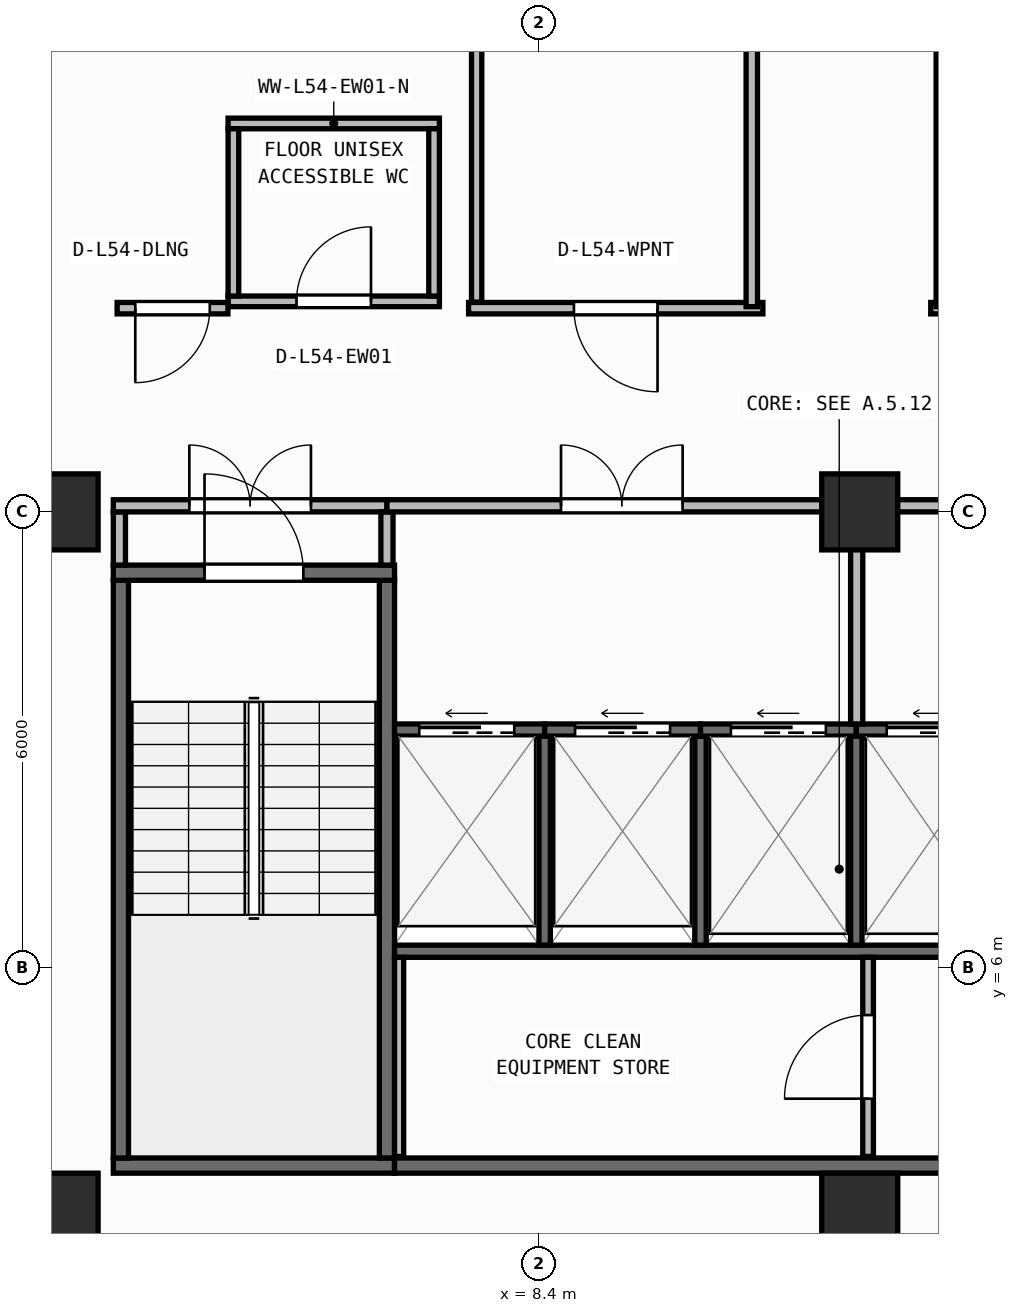
"""IFC4 building model, lengths in metres.
Left out: names, types, materials, properties, quantities, classifications, styles, units other than length and angle.
Written with IfcOpenShell. Run it as: python <this file> out.ifc"""

import sys

from ifc_helpers import new_model, si_unit, direction, frame, frame_2d, origin, origin_2d, place, context, subcontext, project, spatial, rectangle, extrude, element, fill, save


model = new_model("IFC4")
c1 = context("Model", 3, precision=1e-05, world=origin(), true_north=direction((0.0, 1.0)))
c2 = subcontext(c1, "Body", "Model", "MODEL_VIEW")
j1 = project(units=[si_unit("LENGTHUNIT", "METRE"), si_unit("PLANEANGLEUNIT", "RADIAN")], contexts=[c1])
p1 = place(None, origin())
s1 = spatial("IfcSite", under=j1, at=p1, CompositionType="ELEMENT")
p2 = place(p1, origin())
s2 = spatial("IfcBuilding", under=s1, at=p2, CompositionType="ELEMENT")
p3 = place(p2, frame((0.0, 0.0, 219.75)))
s3 = spatial("IfcBuildingStorey", under=s2, at=p3, CompositionType="ELEMENT", Elevation=219.75)
for number, where, z_axis, x_axis in (
    (1, (2.1, 2.8, 0.0), (0.0, 0.0, 1.0), (1.0, 0.0, 0.0)),
    (2, (12.62, 2.8, 0.0), (0.0, 0.0, 1.0), (1.0, 0.0, 0.0)),
    (3, (2.1, 12.0, 0.0), (0.0, 0.0, 1.0), (1.0, 0.0, 0.0)),
    (4, (12.62, 12.0, 0.0), (0.0, 0.0, 1.0), (1.0, 0.0, 0.0)),
):
    element("IfcColumn", number, at=place(p3, frame(where, z_axis=z_axis, x_axis=x_axis)), inside=s3, PredefinedType="COLUMN", context=c2, shape_type="SweptSolid", body=[
        extrude(rectangle(XDim=1.0, YDim=1.0, at=origin_2d()), origin(), (0.0, 0.0, 1.0), 3.95),
    ])
p4 = place(p3, frame((2.66, 0.174, 0.0), z_axis=(0.0, 0.0, 1.0), x_axis=(0.996634028439, 0.081979347142, 0.0)))
e5 = element("IfcWall", 5, at=p4, inside=s3, PredefinedType="STANDARD", context=c2, shape_type="SweptSolid", body=[
    extrude(rectangle(XDim=46.035, YDim=0.26, at=frame_2d((23.018, 0.0))), origin(), (0.0, 0.0, 1.0), 3.71),
])
p5 = place(p4, frame((21.817, 0.0, 0.9)))
e6 = element("IfcOpeningElement", 6, at=p5, cuts=e5, PredefinedType="OPENING", context=c2, shape_type="SweptSolid", body=[
    extrude(rectangle(XDim=2.4, YDim=1.65, at=frame_2d((1.2, 0.825))), frame((0.0, 0.14, 0.0), z_axis=(0.0, -1.0, 0.0), x_axis=(1.0, 0.0, 0.0)), (0.0, 0.0, 1.0), 0.28),
])
p6 = place(p3, frame((2.8, 3.4, 0.0), z_axis=(0.0, 0.0, 1.0), x_axis=(1.0, 0.0, 0.0)))
e7 = element("IfcWall", 7, at=p6, inside=s3, PredefinedType="SHEAR", context=c2, shape_type="SweptSolid", body=[
    extrude(rectangle(XDim=3.7, YDim=0.2, at=frame_2d((1.85, 0.0))), origin(), (0.0, 0.0, 1.0), 3.71),
])
for number, where, z_axis, x_axis in (
    (8, (2.9, 3.5, 0.0), (0.0, 0.0, 1.0), (0.0, 1.0, 0.0)),
    (9, (6.4, 3.5, 0.0), (0.0, 0.0, 1.0), (0.0, 1.0, 0.0)),
):
    element("IfcWall", number, at=place(p3, frame(where, z_axis=z_axis, x_axis=x_axis)), inside=s3, PredefinedType="SHEAR", context=c2, shape_type="SweptSolid", body=[
        extrude(rectangle(XDim=7.6, YDim=0.2, at=frame_2d((3.8, 0.0))), origin(), (0.0, 0.0, 1.0), 3.71),
    ])
p7 = place(p3, frame((2.8, 11.2, 0.0), z_axis=(0.0, 0.0, 1.0), x_axis=(1.0, 0.0, 0.0)))
e10 = element("IfcWall", 10, at=p7, inside=s3, PredefinedType="SHEAR", context=c2, shape_type="SweptSolid", body=[
    extrude(rectangle(XDim=3.7, YDim=0.2, at=frame_2d((1.85, 0.0))), origin(), (0.0, 0.0, 1.0), 3.71),
])
p8 = place(p7, frame((1.2, 0.0, 0.0)))
e11 = element("IfcOpeningElement", 11, at=p8, cuts=e10, PredefinedType="OPENING", context=c2, shape_type="SweptSolid", body=[
    extrude(rectangle(XDim=1.3, YDim=2.15, at=frame_2d((0.65, 1.075))), frame((0.0, 0.11, 0.0), z_axis=(0.0, -1.0, 0.0), x_axis=(1.0, 0.0, 0.0)), (0.0, 0.0, 1.0), 0.22),
])
p9 = place(p3, frame((6.5, 3.4, 0.0), z_axis=(0.0, 0.0, 1.0), x_axis=(1.0, 0.0, 0.0)))
e12 = element("IfcWall", 12, at=p9, inside=s3, PredefinedType="SHEAR", context=c2, shape_type="SweptSolid", body=[
    extrude(rectangle(XDim=13.7, YDim=0.2, at=frame_2d((6.85, 0.0))), origin(), (0.0, 0.0, 1.0), 3.71),
])
p10 = place(p3, frame((6.5, 6.22, 0.0), z_axis=(0.0, 0.0, 1.0), x_axis=(1.0, 0.0, 0.0)))
e13 = element("IfcWall", 13, at=p10, inside=s3, PredefinedType="SHEAR", context=c2, shape_type="SweptSolid", body=[
    extrude(rectangle(XDim=12.11, YDim=0.16, at=frame_2d((6.055, 0.0))), origin(), (0.0, 0.0, 1.0), 3.71),
])
for number, where, z_axis, x_axis in (
    (14, (8.475, 6.3, 0.0), (0.0, 0.0, 1.0), (0.0, 1.0, 0.0)),
    (15, (10.525, 6.3, 0.0), (0.0, 0.0, 1.0), (0.0, 1.0, 0.0)),
    (16, (12.575, 6.3, 0.0), (0.0, 0.0, 1.0), (0.0, 1.0, 0.0)),
):
    element("IfcWall", number, at=place(p3, frame(where, z_axis=z_axis, x_axis=x_axis)), inside=s3, PredefinedType="SHEAR", context=c2, shape_type="SweptSolid", body=[
        extrude(rectangle(XDim=2.75, YDim=0.15, at=frame_2d((1.375, 0.0))), origin(), (0.0, 0.0, 1.0), 3.71),
    ])
p11 = place(p3, frame((6.5, 9.13, 0.0), z_axis=(0.0, 0.0, 1.0), x_axis=(1.0, 0.0, 0.0)))
e17 = element("IfcWall", 17, at=p11, inside=s3, PredefinedType="SHEAR", context=c2, shape_type="SweptSolid", body=[
    extrude(rectangle(XDim=1.975, YDim=0.16, at=frame_2d((0.988, 0.0))), origin(), (0.0, 0.0, 1.0), 3.71),
])
p12 = place(p11, frame((0.325, 0.0, 0.0)))
e18 = element("IfcOpeningElement", 18, at=p12, cuts=e17, PredefinedType="OPENING", context=c2, shape_type="SweptSolid", body=[
    extrude(rectangle(XDim=1.25, YDim=2.15, at=frame_2d((0.625, 1.075))), frame((0.0, 0.09, 0.0), z_axis=(0.0, -1.0, 0.0), x_axis=(1.0, 0.0, 0.0)), (0.0, 0.0, 1.0), 0.18),
])
p13 = place(p3, frame((8.475, 9.13, 0.0), z_axis=(0.0, 0.0, 1.0), x_axis=(1.0, 0.0, 0.0)))
e19 = element("IfcWall", 19, at=p13, inside=s3, PredefinedType="SHEAR", context=c2, shape_type="SweptSolid", body=[
    extrude(rectangle(XDim=2.05, YDim=0.16, at=frame_2d((1.025, 0.0))), origin(), (0.0, 0.0, 1.0), 3.71),
])
p14 = place(p13, frame((0.4, 0.0, 0.0)))
e20 = element("IfcOpeningElement", 20, at=p14, cuts=e19, PredefinedType="OPENING", context=c2, shape_type="SweptSolid", body=[
    extrude(rectangle(XDim=1.25, YDim=2.15, at=frame_2d((0.625, 1.075))), frame((0.0, 0.09, 0.0), z_axis=(0.0, -1.0, 0.0), x_axis=(1.0, 0.0, 0.0)), (0.0, 0.0, 1.0), 0.18),
])
p15 = place(p3, frame((10.525, 9.13, 0.0), z_axis=(0.0, 0.0, 1.0), x_axis=(1.0, 0.0, 0.0)))
e21 = element("IfcWall", 21, at=p15, inside=s3, PredefinedType="SHEAR", context=c2, shape_type="SweptSolid", body=[
    extrude(rectangle(XDim=2.05, YDim=0.16, at=frame_2d((1.025, 0.0))), origin(), (0.0, 0.0, 1.0), 3.71),
])
p16 = place(p15, frame((0.4, 0.0, 0.0)))
e22 = element("IfcOpeningElement", 22, at=p16, cuts=e21, PredefinedType="OPENING", context=c2, shape_type="SweptSolid", body=[
    extrude(rectangle(XDim=1.25, YDim=2.15, at=frame_2d((0.625, 1.075))), frame((0.0, 0.09, 0.0), z_axis=(0.0, -1.0, 0.0), x_axis=(1.0, 0.0, 0.0)), (0.0, 0.0, 1.0), 0.18),
])
p17 = place(p3, frame((12.575, 9.13, 0.0), z_axis=(0.0, 0.0, 1.0), x_axis=(1.0, 0.0, 0.0)))
e23 = element("IfcWall", 23, at=p17, inside=s3, PredefinedType="SHEAR", context=c2, shape_type="SweptSolid", body=[
    extrude(rectangle(XDim=2.05, YDim=0.16, at=frame_2d((1.025, 0.0))), origin(), (0.0, 0.0, 1.0), 3.71),
])
p18 = place(p17, frame((0.4, 0.0, 0.0)))
e24 = element("IfcOpeningElement", 24, at=p18, cuts=e23, PredefinedType="OPENING", context=c2, shape_type="SweptSolid", body=[
    extrude(rectangle(XDim=1.25, YDim=2.15, at=frame_2d((0.625, 1.075))), frame((0.0, 0.09, 0.0), z_axis=(0.0, -1.0, 0.0), x_axis=(1.0, 0.0, 0.0)), (0.0, 0.0, 1.0), 0.18),
])
p19 = place(p3, frame((6.56, 3.52, 0.0), z_axis=(0.0, 0.0, 1.0), x_axis=(0.0, 1.0, 0.0)))
e25 = element("IfcWall", 25, at=p19, inside=s3, PredefinedType="PARTITIONING", context=c2, shape_type="SweptSolid", body=[
    extrude(rectangle(XDim=2.62, YDim=0.12, at=frame_2d((1.31, 0.0))), origin(), (0.0, 0.0, 1.0), 3.71),
])
p20 = place(p3, frame((12.73, 3.52, 0.0), z_axis=(0.0, 0.0, 1.0), x_axis=(0.0, 1.0, 0.0)))
e26 = element("IfcWall", 26, at=p20, inside=s3, PredefinedType="PARTITIONING", context=c2, shape_type="SweptSolid", body=[
    extrude(rectangle(XDim=2.62, YDim=0.14, at=frame_2d((1.31, 0.0))), origin(), (0.0, 0.0, 1.0), 3.71),
])
p21 = place(p20, frame((0.76, 0.0, 0.0)))
e27 = element("IfcOpeningElement", 27, at=p21, cuts=e26, PredefinedType="OPENING", context=c2, shape_type="SweptSolid", body=[
    extrude(rectangle(XDim=1.1, YDim=2.1, at=frame_2d((0.55, 1.05))), frame((0.0, 0.08, 0.0), z_axis=(0.0, -1.0, 0.0), x_axis=(1.0, 0.0, 0.0)), (0.0, 0.0, 1.0), 0.16),
])
p22 = place(p3, frame((2.88, 11.3, 0.0), z_axis=(0.0, 0.0, 1.0), x_axis=(0.0, 1.0, 0.0)))
e28 = element("IfcWall", 28, at=p22, inside=s3, PredefinedType="PARTITIONING", context=c2, shape_type="SweptSolid", body=[
    extrude(rectangle(XDim=0.7, YDim=0.16, at=frame_2d((0.35, 0.0))), origin(), (0.0, 0.0, 1.0), 3.71),
])
p23 = place(p3, frame((2.8, 12.08, 0.0), z_axis=(0.0, 0.0, 1.0), x_axis=(1.0, 0.0, 0.0)))
e29 = element("IfcWall", 29, at=p23, inside=s3, PredefinedType="PARTITIONING", context=c2, shape_type="SweptSolid", body=[
    extrude(rectangle(XDim=3.6, YDim=0.16, at=frame_2d((1.8, 0.0))), origin(), (0.0, 0.0, 1.0), 3.152),
])
p24 = place(p23, frame((1.0, 0.0, 0.0)))
e30 = element("IfcOpeningElement", 30, at=p24, cuts=e29, PredefinedType="OPENING", context=c2, shape_type="SweptSolid", body=[
    extrude(rectangle(XDim=1.6, YDim=2.05, at=frame_2d((0.8, 1.025))), frame((0.0, 0.09, 0.0), z_axis=(0.0, -1.0, 0.0), x_axis=(1.0, 0.0, 0.0)), (0.0, 0.0, 1.0), 0.18),
])
p25 = place(p3, frame((6.4, 11.3, 0.0), z_axis=(0.0, 0.0, 1.0), x_axis=(0.0, 1.0, 0.0)))
e31 = element("IfcWall", 31, at=p25, inside=s3, PredefinedType="PARTITIONING", context=c2, shape_type="SweptSolid", body=[
    extrude(rectangle(XDim=0.7, YDim=0.16, at=frame_2d((0.35, 0.0))), origin(), (0.0, 0.0, 1.0), 3.71),
])
p26 = place(p3, frame((6.4, 12.08, 0.0), z_axis=(0.0, 0.0, 1.0), x_axis=(1.0, 0.0, 0.0)))
e32 = element("IfcWall", 32, at=p26, inside=s3, PredefinedType="PARTITIONING", context=c2, shape_type="SweptSolid", body=[
    extrude(rectangle(XDim=6.18, YDim=0.16, at=frame_2d((3.09, 0.0))), origin(), (0.0, 0.0, 1.0), 3.152),
])
p27 = place(p26, frame((2.29, 0.0, 0.0)))
e33 = element("IfcOpeningElement", 33, at=p27, cuts=e32, PredefinedType="OPENING", context=c2, shape_type="SweptSolid", body=[
    extrude(rectangle(XDim=1.6, YDim=2.05, at=frame_2d((0.8, 1.025))), frame((0.0, 0.09, 0.0), z_axis=(0.0, -1.0, 0.0), x_axis=(1.0, 0.0, 0.0)), (0.0, 0.0, 1.0), 0.18),
])
p28 = place(p3, frame((12.58, 9.21, 0.0), z_axis=(0.0, 0.0, 1.0), x_axis=(0.0, 1.0, 0.0)))
e34 = element("IfcWall", 34, at=p28, inside=s3, PredefinedType="PARTITIONING", context=c2, shape_type="SweptSolid", body=[
    extrude(rectangle(XDim=2.79, YDim=0.16, at=frame_2d((1.395, 0.0))), origin(), (0.0, 0.0, 1.0), 3.71),
])
p29 = place(p3, frame((12.58, 12.08, 0.0), z_axis=(0.0, 0.0, 1.0), x_axis=(1.0, 0.0, 0.0)))
e35 = element("IfcWall", 35, at=p29, inside=s3, PredefinedType="PARTITIONING", context=c2, shape_type="SweptSolid", body=[
    extrude(rectangle(XDim=7.7, YDim=0.16, at=frame_2d((3.85, 0.0))), origin(), (0.0, 0.0, 1.0), 3.152),
])
p30 = place(p29, frame((3.05, 0.0, 0.0)))
e36 = element("IfcOpeningElement", 36, at=p30, cuts=e35, PredefinedType="OPENING", context=c2, shape_type="SweptSolid", body=[
    extrude(rectangle(XDim=1.6, YDim=2.05, at=frame_2d((0.8, 1.025))), frame((0.0, 0.09, 0.0), z_axis=(0.0, -1.0, 0.0), x_axis=(1.0, 0.0, 0.0)), (0.0, 0.0, 1.0), 0.18),
])
p31 = place(p3, frame((4.31, 14.77, 0.0), z_axis=(0.0, 0.0, 1.0), x_axis=(1.0, 0.0, 0.0)))
e37 = element("IfcWall", 37, at=p31, inside=s3, PredefinedType="PARTITIONING", context=c2, shape_type="SweptSolid", body=[
    extrude(rectangle(XDim=2.78, YDim=0.14, at=frame_2d((1.39, 0.0))), origin(), (0.0, 0.0, 1.0), 3.71),
])
p32 = place(p31, frame((0.9, 0.0, 0.0)))
e38 = element("IfcOpeningElement", 38, at=p32, cuts=e37, PredefinedType="OPENING", context=c2, shape_type="SweptSolid", body=[
    extrude(rectangle(XDim=0.98, YDim=2.1, at=frame_2d((0.49, 1.05))), frame((0.0, 0.08, 0.0), z_axis=(0.0, -1.0, 0.0), x_axis=(1.0, 0.0, 0.0)), (0.0, 0.0, 1.0), 0.16),
])
p33 = place(p3, frame((4.31, 17.11, 0.0), z_axis=(0.0, 0.0, 1.0), x_axis=(1.0, 0.0, 0.0)))
e39 = element("IfcWall", 39, at=p33, inside=s3, PredefinedType="PARTITIONING", context=c2, shape_type="SweptSolid", body=[
    extrude(rectangle(XDim=2.78, YDim=0.14, at=frame_2d((1.39, 0.0))), origin(), (0.0, 0.0, 1.0), 3.71),
])
for number, where, z_axis, x_axis in (
    (40, (4.38, 14.84, 0.0), (0.0, 0.0, 1.0), (0.0, 1.0, 0.0)),
    (41, (7.02, 14.84, 0.0), (0.0, 0.0, 1.0), (0.0, 1.0, 0.0)),
):
    element("IfcWall", number, at=place(p3, frame(where, z_axis=z_axis, x_axis=x_axis)), inside=s3, PredefinedType="PARTITIONING", context=c2, shape_type="SweptSolid", body=[
        extrude(rectangle(XDim=2.2, YDim=0.14, at=frame_2d((1.1, 0.0))), origin(), (0.0, 0.0, 1.0), 3.71),
    ])
p34 = place(p3, frame((4.308, 14.68, 0.0), z_axis=(0.0, 0.0, 1.0), x_axis=(-1.0, 0.0, 0.0)))
e42 = element("IfcWall", 42, at=p34, inside=s3, PredefinedType="PARTITIONING", context=c2, shape_type="SweptSolid", body=[
    extrude(rectangle(XDim=1.458, YDim=0.15, at=frame_2d((0.729, 0.0))), origin(), (0.0, 0.0, 1.0), 3.71),
])
p35 = place(p34, frame((0.239, 0.0, 0.0)))
e43 = element("IfcOpeningElement", 43, at=p35, cuts=e42, PredefinedType="OPENING", context=c2, shape_type="SweptSolid", body=[
    extrude(rectangle(XDim=0.98, YDim=2.1, at=frame_2d((0.49, 1.05))), frame((0.0, 0.085, 0.0), z_axis=(0.0, -1.0, 0.0), x_axis=(1.0, 0.0, 0.0)), (0.0, 0.0, 1.0), 0.17),
])
p36 = place(p3, frame((11.346, 14.68, 0.0), z_axis=(0.0, 0.0, 1.0), x_axis=(-1.0, 0.0, 0.0)))
e44 = element("IfcWall", 44, at=p36, inside=s3, PredefinedType="PARTITIONING", context=c2, shape_type="SweptSolid", body=[
    extrude(rectangle(XDim=3.872, YDim=0.15, at=frame_2d((1.936, 0.0))), origin(), (0.0, 0.0, 1.0), 3.71),
])
p37 = place(p36, frame((1.386, 0.0, 0.0)))
e45 = element("IfcOpeningElement", 45, at=p37, cuts=e44, PredefinedType="OPENING", context=c2, shape_type="SweptSolid", body=[
    extrude(rectangle(XDim=1.1, YDim=2.1, at=frame_2d((0.55, 1.05))), frame((0.0, 0.085, 0.0), z_axis=(0.0, -1.0, 0.0), x_axis=(1.0, 0.0, 0.0)), (0.0, 0.0, 1.0), 0.17),
])
p38 = place(p3, frame((34.766, 14.68, 0.0), z_axis=(0.0, 0.0, 1.0), x_axis=(-1.0, 0.0, 0.0)))
e46 = element("IfcWall", 46, at=p38, inside=s3, PredefinedType="PARTITIONING", context=c2, shape_type="SweptSolid", body=[
    extrude(rectangle(XDim=21.212, YDim=0.15, at=frame_2d((10.606, 0.0))), origin(), (0.0, 0.0, 1.0), 3.71),
])
p39 = place(p38, frame((10.056, 0.0, 0.0)))
e47 = element("IfcOpeningElement", 47, at=p39, cuts=e46, PredefinedType="OPENING", context=c2, shape_type="SweptSolid", body=[
    extrude(rectangle(XDim=1.1, YDim=2.1, at=frame_2d((0.55, 1.05))), frame((0.0, 0.085, 0.0), z_axis=(0.0, -1.0, 0.0), x_axis=(1.0, 0.0, 0.0)), (0.0, 0.0, 1.0), 0.17),
])
p40 = place(p3, frame((11.2, 26.6, 0.0), z_axis=(0.0, 0.0, 1.0), x_axis=(0.0, -1.0, 0.0)))
e48 = element("IfcWall", 48, at=p40, inside=s3, PredefinedType="PARTITIONING", context=c2, shape_type="SweptSolid", body=[
    extrude(rectangle(XDim=11.9, YDim=0.15, at=frame_2d((5.95, 0.0))), origin(), (0.0, 0.0, 1.0), 3.71),
])
p41 = place(p3, frame((13.7, 14.7, 0.0), z_axis=(0.0, 0.0, 1.0), x_axis=(0.0, 1.0, 0.0)))
e49 = element("IfcWall", 49, at=p41, inside=s3, PredefinedType="PARTITIONING", context=c2, shape_type="SweptSolid", body=[
    extrude(rectangle(XDim=5.326, YDim=0.15, at=frame_2d((2.663, 0.0))), origin(), (0.0, 0.0, 1.0), 3.71),
])
p42 = place(p3, frame((7.58, 14.76, 0.0), z_axis=(0.0, 0.0, 1.0), x_axis=(0.0, 1.0, 0.0)))
e50 = element("IfcWall", 50, at=p42, inside=s3, PredefinedType="PARTITIONING", context=c2, shape_type="SweptSolid", body=[
    extrude(rectangle(XDim=11.76, YDim=0.135, at=frame_2d((5.88, 0.0))), origin(), (0.0, 0.0, 1.0), 3.71),
])
p43 = place(p8, origin())
e51 = element("IfcDoor", 51, at=p43, inside=s3, OperationType="SINGLE_SWING_LEFT", PredefinedType="DOOR", context=c2, shape_type="SweptSolid", body=[
    extrude(rectangle(XDim=1.3, YDim=2.15, at=frame_2d((0.65, 1.075))), frame((0.0, 0.025, 0.0), z_axis=(0.0, -1.0, 0.0), x_axis=(1.0, 0.0, 0.0)), (0.0, 0.0, 1.0), 0.05),
])
fill(e11, e51)
p44 = place(p12, origin())
e52 = element("IfcDoor", 52, at=p44, inside=s3, OperationType="SLIDING_TO_LEFT", PredefinedType="DOOR", context=c2, shape_type="SweptSolid", body=[
    extrude(rectangle(XDim=1.25, YDim=2.15, at=frame_2d((0.625, 1.075))), frame((0.0, 0.025, 0.0), z_axis=(0.0, -1.0, 0.0), x_axis=(1.0, 0.0, 0.0)), (0.0, 0.0, 1.0), 0.05),
])
fill(e18, e52)
p45 = place(p14, origin())
e53 = element("IfcDoor", 53, at=p45, inside=s3, OperationType="SLIDING_TO_LEFT", PredefinedType="DOOR", context=c2, shape_type="SweptSolid", body=[
    extrude(rectangle(XDim=1.25, YDim=2.15, at=frame_2d((0.625, 1.075))), frame((0.0, 0.025, 0.0), z_axis=(0.0, -1.0, 0.0), x_axis=(1.0, 0.0, 0.0)), (0.0, 0.0, 1.0), 0.05),
])
fill(e20, e53)
p46 = place(p16, origin())
e54 = element("IfcDoor", 54, at=p46, inside=s3, OperationType="SLIDING_TO_LEFT", PredefinedType="DOOR", context=c2, shape_type="SweptSolid", body=[
    extrude(rectangle(XDim=1.25, YDim=2.15, at=frame_2d((0.625, 1.075))), frame((0.0, 0.025, 0.0), z_axis=(0.0, -1.0, 0.0), x_axis=(1.0, 0.0, 0.0)), (0.0, 0.0, 1.0), 0.05),
])
fill(e22, e54)
p47 = place(p18, origin())
e55 = element("IfcDoor", 55, at=p47, inside=s3, OperationType="SLIDING_TO_LEFT", PredefinedType="DOOR", context=c2, shape_type="SweptSolid", body=[
    extrude(rectangle(XDim=1.25, YDim=2.15, at=frame_2d((0.625, 1.075))), frame((0.0, 0.025, 0.0), z_axis=(0.0, -1.0, 0.0), x_axis=(1.0, 0.0, 0.0)), (0.0, 0.0, 1.0), 0.05),
])
fill(e24, e55)
p48 = place(p21, origin())
e56 = element("IfcDoor", 56, at=p48, inside=s3, OperationType="SINGLE_SWING_LEFT", PredefinedType="DOOR", context=c2, shape_type="SweptSolid", body=[
    extrude(rectangle(XDim=1.1, YDim=2.1, at=frame_2d((0.55, 1.05))), frame((0.0, 0.025, 0.0), z_axis=(0.0, -1.0, 0.0), x_axis=(1.0, 0.0, 0.0)), (0.0, 0.0, 1.0), 0.05),
])
fill(e27, e56)
p49 = place(p24, origin())
e57 = element("IfcDoor", 57, at=p49, inside=s3, OperationType="DOUBLE_DOOR_SINGLE_SWING", PredefinedType="DOOR", context=c2, shape_type="SweptSolid", body=[
    extrude(rectangle(XDim=1.6, YDim=2.05, at=frame_2d((0.8, 1.025))), frame((0.0, 0.025, 0.0), z_axis=(0.0, -1.0, 0.0), x_axis=(1.0, 0.0, 0.0)), (0.0, 0.0, 1.0), 0.05),
])
fill(e30, e57)
p50 = place(p27, origin())
e58 = element("IfcDoor", 58, at=p50, inside=s3, OperationType="DOUBLE_DOOR_SINGLE_SWING", PredefinedType="DOOR", context=c2, shape_type="SweptSolid", body=[
    extrude(rectangle(XDim=1.6, YDim=2.05, at=frame_2d((0.8, 1.025))), frame((0.0, 0.025, 0.0), z_axis=(0.0, -1.0, 0.0), x_axis=(1.0, 0.0, 0.0)), (0.0, 0.0, 1.0), 0.05),
])
fill(e33, e58)
p51 = place(p32, origin())
e59 = element("IfcDoor", 59, at=p51, inside=s3, OperationType="SINGLE_SWING_RIGHT", PredefinedType="DOOR", context=c2, shape_type="SweptSolid", body=[
    extrude(rectangle(XDim=0.98, YDim=2.1, at=frame_2d((0.49, 1.05))), frame((0.0, 0.025, 0.0), z_axis=(0.0, -1.0, 0.0), x_axis=(1.0, 0.0, 0.0)), (0.0, 0.0, 1.0), 0.05),
])
fill(e38, e59)
p52 = place(p35, origin())
e60 = element("IfcDoor", 60, at=p52, inside=s3, OperationType="SINGLE_SWING_RIGHT", PredefinedType="DOOR", context=c2, shape_type="SweptSolid", body=[
    extrude(rectangle(XDim=0.98, YDim=2.1, at=frame_2d((0.49, 1.05))), frame((0.0, 0.025, 0.0), z_axis=(0.0, -1.0, 0.0), x_axis=(1.0, 0.0, 0.0)), (0.0, 0.0, 1.0), 0.05),
])
fill(e43, e60)
p53 = place(p37, origin())
e61 = element("IfcDoor", 61, at=p53, inside=s3, OperationType="SINGLE_SWING_LEFT", PredefinedType="DOOR", context=c2, shape_type="SweptSolid", body=[
    extrude(rectangle(XDim=1.1, YDim=2.1, at=frame_2d((0.55, 1.05))), frame((0.0, 0.025, 0.0), z_axis=(0.0, -1.0, 0.0), x_axis=(1.0, 0.0, 0.0)), (0.0, 0.0, 1.0), 0.05),
])
fill(e45, e61)
save(model, sys.argv[1])
